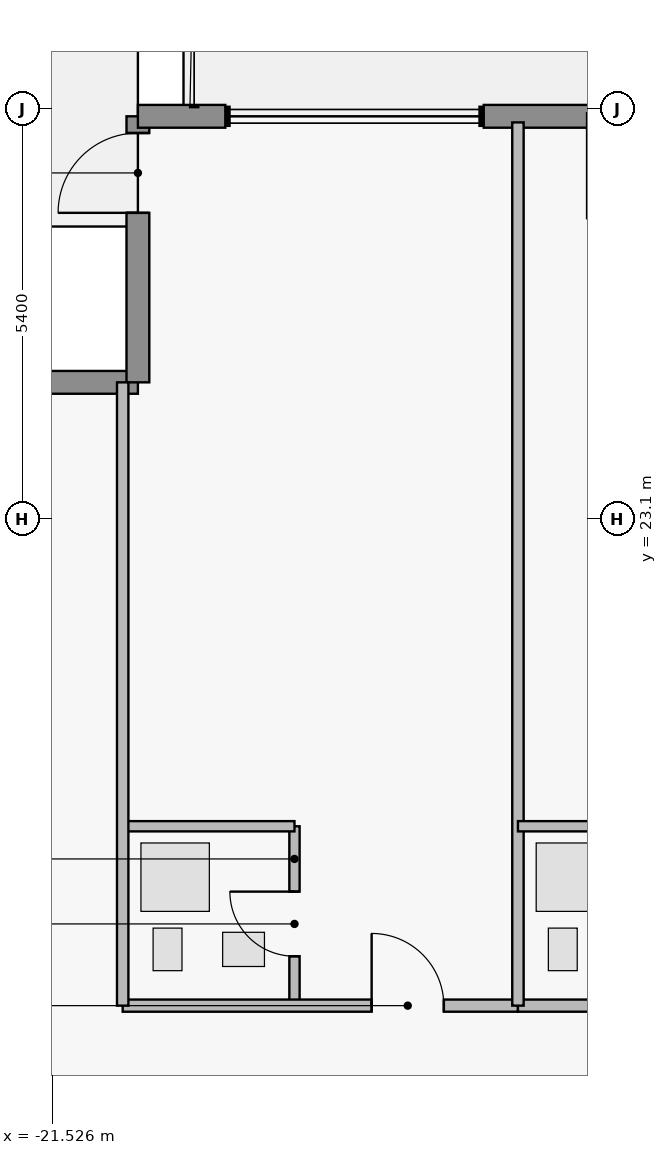
"""IFC4 building model, lengths in metres.
Left out: names, types, materials, properties, quantities, classifications, styles, units other than length and angle.
Written with IfcOpenShell. Run it as: python <this file> out.ifc"""

import sys

from ifc_helpers import new_model, si_unit, direction, frame, frame_2d, origin, place, context, subcontext, project, spatial, rectangle, extrude, element, fill, save


model = new_model("IFC4")
c1 = context("Model", 3, precision=1e-05, world=origin(), true_north=direction((0.0, 1.0)))
c2 = subcontext(c1, "Body", "Model", "MODEL_VIEW")
j1 = project(units=[si_unit("LENGTHUNIT", "METRE"), si_unit("PLANEANGLEUNIT", "RADIAN")], contexts=[c1])
p1 = place(None, origin())
s1 = spatial("IfcSite", under=j1, at=p1, CompositionType="ELEMENT")
p2 = place(p1, origin())
s2 = spatial("IfcBuilding", under=s1, at=p2, CompositionType="ELEMENT")
p3 = place(p2, frame((0.0, 0.0, 106.6)))
s3 = spatial("IfcBuildingStorey", under=s2, at=p3, CompositionType="ELEMENT", Elevation=106.6)
p4 = place(p3, frame((-23.9, 24.9, 0.0), z_axis=(0.0, 0.0, 1.0), x_axis=(1.0, 0.0, 0.0)))
e1 = element("IfcWall", 1, at=p4, inside=s3, PredefinedType="STANDARD", context=c2, shape_type="SweptSolid", body=[
    extrude(rectangle(XDim=3.5, YDim=0.3, at=frame_2d((1.75, 0.0))), origin(), (0.0, 0.0, 1.0), 3.43),
])
p5 = place(p4, frame((1.065, 0.0, 1.25)))
e2 = element("IfcOpeningElement", 2, at=p5, cuts=e1, PredefinedType="OPENING", context=c2, shape_type="SweptSolid", body=[
    extrude(rectangle(XDim=1.15, YDim=1.55, at=frame_2d((0.575, 0.775))), frame((0.0, 0.16, 0.0), z_axis=(0.0, -1.0, 0.0), x_axis=(1.0, 0.0, 0.0)), (0.0, 0.0, 1.0), 0.32),
])
p6 = place(p3, frame((-20.4, 24.9, 0.0), z_axis=(0.0, 0.0, 1.0), x_axis=(0.0, 1.0, 0.0)))
e3 = element("IfcWall", 3, at=p6, inside=s3, PredefinedType="STANDARD", context=c2, shape_type="SweptSolid", body=[
    extrude(rectangle(XDim=3.5, YDim=0.3, at=frame_2d((1.75, 0.0))), origin(), (0.0, 0.0, 1.0), 3.43),
])
p7 = place(p6, frame((2.23, 0.0, 0.0)))
e4 = element("IfcOpeningElement", 4, at=p7, cuts=e3, PredefinedType="OPENING", context=c2, shape_type="SweptSolid", body=[
    extrude(rectangle(XDim=1.05, YDim=2.2, at=frame_2d((0.525, 1.1))), frame((0.0, 0.16, 0.0), z_axis=(0.0, -1.0, 0.0), x_axis=(1.0, 0.0, 0.0)), (0.0, 0.0, 1.0), 0.32),
])
p8 = place(p3, frame((-20.4, 28.4, 0.0), z_axis=(0.0, 0.0, 1.0), x_axis=(1.0, 0.0, 0.0)))
e5 = element("IfcWall", 5, at=p8, inside=s3, PredefinedType="STANDARD", context=c2, shape_type="SweptSolid", body=[
    extrude(rectangle(XDim=1.15, YDim=0.3, at=frame_2d((0.575, 0.0))), origin(), (0.0, 0.0, 1.0), 3.43),
])
p9 = place(p3, frame((-15.85, 28.4, 0.0), z_axis=(0.0, 0.0, 1.0), x_axis=(1.0, 0.0, 0.0)))
e6 = element("IfcWall", 6, at=p9, inside=s3, PredefinedType="STANDARD", context=c2, shape_type="SweptSolid", body=[
    extrude(rectangle(XDim=2.97, YDim=0.3, at=frame_2d((1.485, 0.0))), origin(), (0.0, 0.0, 1.0), 3.43),
])
p10 = place(p3, frame((-18.34, 16.7, 0.0), z_axis=(0.0, 0.0, 1.0), x_axis=(0.0, 1.0, 0.0)))
e7 = element("IfcWall", 7, at=p10, inside=s3, PredefinedType="PLUMBINGWALL", context=c2, shape_type="SweptSolid", body=[
    extrude(rectangle(XDim=2.36, YDim=0.135, at=frame_2d((1.18, 0.0))), origin(), (0.0, 0.0, 1.0), 3.43),
])
p11 = place(p10, frame((0.65, 0.0, 0.0)))
e8 = element("IfcOpeningElement", 8, at=p11, cuts=e7, PredefinedType="OPENING", context=c2, shape_type="SweptSolid", body=[
    extrude(rectangle(XDim=0.85, YDim=2.1, at=frame_2d((0.425, 1.05))), frame((0.0, 0.077, 0.0), z_axis=(0.0, -1.0, 0.0), x_axis=(1.0, 0.0, 0.0)), (0.0, 0.0, 1.0), 0.155),
])
p12 = place(p3, frame((-20.6, 16.7, 0.0), z_axis=(0.0, 0.0, 1.0), x_axis=(1.0, 0.0, 0.0)))
e9 = element("IfcWall", 9, at=p12, inside=s3, PredefinedType="PARTITIONING", context=c2, shape_type="SweptSolid", body=[
    extrude(rectangle(XDim=5.2, YDim=0.16, at=frame_2d((2.6, 0.0))), origin(), (0.0, 0.0, 1.0), 3.43),
])
p13 = place(p12, frame((3.275, 0.0, 0.0)))
e10 = element("IfcOpeningElement", 10, at=p13, cuts=e9, PredefinedType="OPENING", context=c2, shape_type="SweptSolid", body=[
    extrude(rectangle(XDim=0.95, YDim=2.15, at=frame_2d((0.475, 1.075))), frame((0.0, 0.09, 0.0), z_axis=(0.0, -1.0, 0.0), x_axis=(1.0, 0.0, 0.0)), (0.0, 0.0, 1.0), 0.18),
])
p14 = place(p3, frame((-15.4, 16.7, 0.0), z_axis=(0.0, 0.0, 1.0), x_axis=(1.0, 0.0, 0.0)))
e11 = element("IfcWall", 11, at=p14, inside=s3, PredefinedType="PARTITIONING", context=c2, shape_type="SweptSolid", body=[
    extrude(rectangle(XDim=5.2, YDim=0.16, at=frame_2d((2.6, 0.0))), origin(), (0.0, 0.0, 1.0), 2.973),
])
p15 = place(p14, frame((3.275, 0.0, 0.0)))
e12 = element("IfcOpeningElement", 12, at=p15, cuts=e11, PredefinedType="OPENING", context=c2, shape_type="SweptSolid", body=[
    extrude(rectangle(XDim=0.95, YDim=2.15, at=frame_2d((0.475, 1.075))), frame((0.0, 0.09, 0.0), z_axis=(0.0, -1.0, 0.0), x_axis=(1.0, 0.0, 0.0)), (0.0, 0.0, 1.0), 0.18),
])
p16 = place(p3, frame((-20.6, 19.06, 0.0), z_axis=(0.0, 0.0, 1.0), x_axis=(1.0, 0.0, 0.0)))
e13 = element("IfcWall", 13, at=p16, inside=s3, PredefinedType="PLUMBINGWALL", context=c2, shape_type="SweptSolid", body=[
    extrude(rectangle(XDim=2.26, YDim=0.135, at=frame_2d((1.13, 0.0))), origin(), (0.0, 0.0, 1.0), 3.43),
])
p17 = place(p3, frame((-20.6, 16.7, 0.0), z_axis=(0.0, 0.0, 1.0), x_axis=(0.0, 1.0, 0.0)))
e14 = element("IfcWall", 14, at=p17, inside=s3, PredefinedType="PARTITIONING", context=c2, shape_type="SweptSolid", body=[
    extrude(rectangle(XDim=8.2, YDim=0.15, at=frame_2d((4.1, 0.0))), origin(), (0.0, 0.0, 1.0), 3.43),
])
p18 = place(p3, frame((-15.4, 16.7, 0.0), z_axis=(0.0, 0.0, 1.0), x_axis=(0.0, 1.0, 0.0)))
e15 = element("IfcWall", 15, at=p18, inside=s3, PredefinedType="PARTITIONING", context=c2, shape_type="SweptSolid", body=[
    extrude(rectangle(XDim=11.62, YDim=0.15, at=frame_2d((5.81, 0.0))), origin(), (0.0, 0.0, 1.0), 3.43),
])
p19 = place(p3, frame((-15.4, 19.06, 0.0), z_axis=(0.0, 0.0, 1.0), x_axis=(1.0, 0.0, 0.0)))
e16 = element("IfcWall", 16, at=p19, inside=s3, PredefinedType="PLUMBINGWALL", context=c2, shape_type="SweptSolid", body=[
    extrude(rectangle(XDim=2.26, YDim=0.135, at=frame_2d((1.13, 0.0))), origin(), (0.0, 0.0, 1.0), 2.973),
])
p20 = place(p7, origin())
e17 = element("IfcDoor", 17, at=p20, inside=s3, OperationType="SINGLE_SWING_LEFT", PredefinedType="DOOR", context=c2, shape_type="SweptSolid", body=[
    extrude(rectangle(XDim=1.05, YDim=2.2, at=frame_2d((0.525, 1.1))), frame((0.0, 0.025, 0.0), z_axis=(0.0, -1.0, 0.0), x_axis=(1.0, 0.0, 0.0)), (0.0, 0.0, 1.0), 0.05),
])
fill(e4, e17)
p21 = place(p11, origin())
e18 = element("IfcDoor", 18, at=p21, inside=s3, OperationType="SINGLE_SWING_RIGHT", PredefinedType="DOOR", context=c2, shape_type="SweptSolid", body=[
    extrude(rectangle(XDim=0.85, YDim=2.1, at=frame_2d((0.425, 1.05))), frame((0.0, 0.025, 0.0), z_axis=(0.0, -1.0, 0.0), x_axis=(1.0, 0.0, 0.0)), (0.0, 0.0, 1.0), 0.05),
])
fill(e8, e18)
p22 = place(p13, origin())
e19 = element("IfcDoor", 19, at=p22, inside=s3, OperationType="SINGLE_SWING_LEFT", PredefinedType="DOOR", context=c2, shape_type="SweptSolid", body=[
    extrude(rectangle(XDim=0.95, YDim=2.15, at=frame_2d((0.475, 1.075))), frame((0.0, 0.025, 0.0), z_axis=(0.0, -1.0, 0.0), x_axis=(1.0, 0.0, 0.0)), (0.0, 0.0, 1.0), 0.05),
])
fill(e10, e19)
save(model, sys.argv[1])
